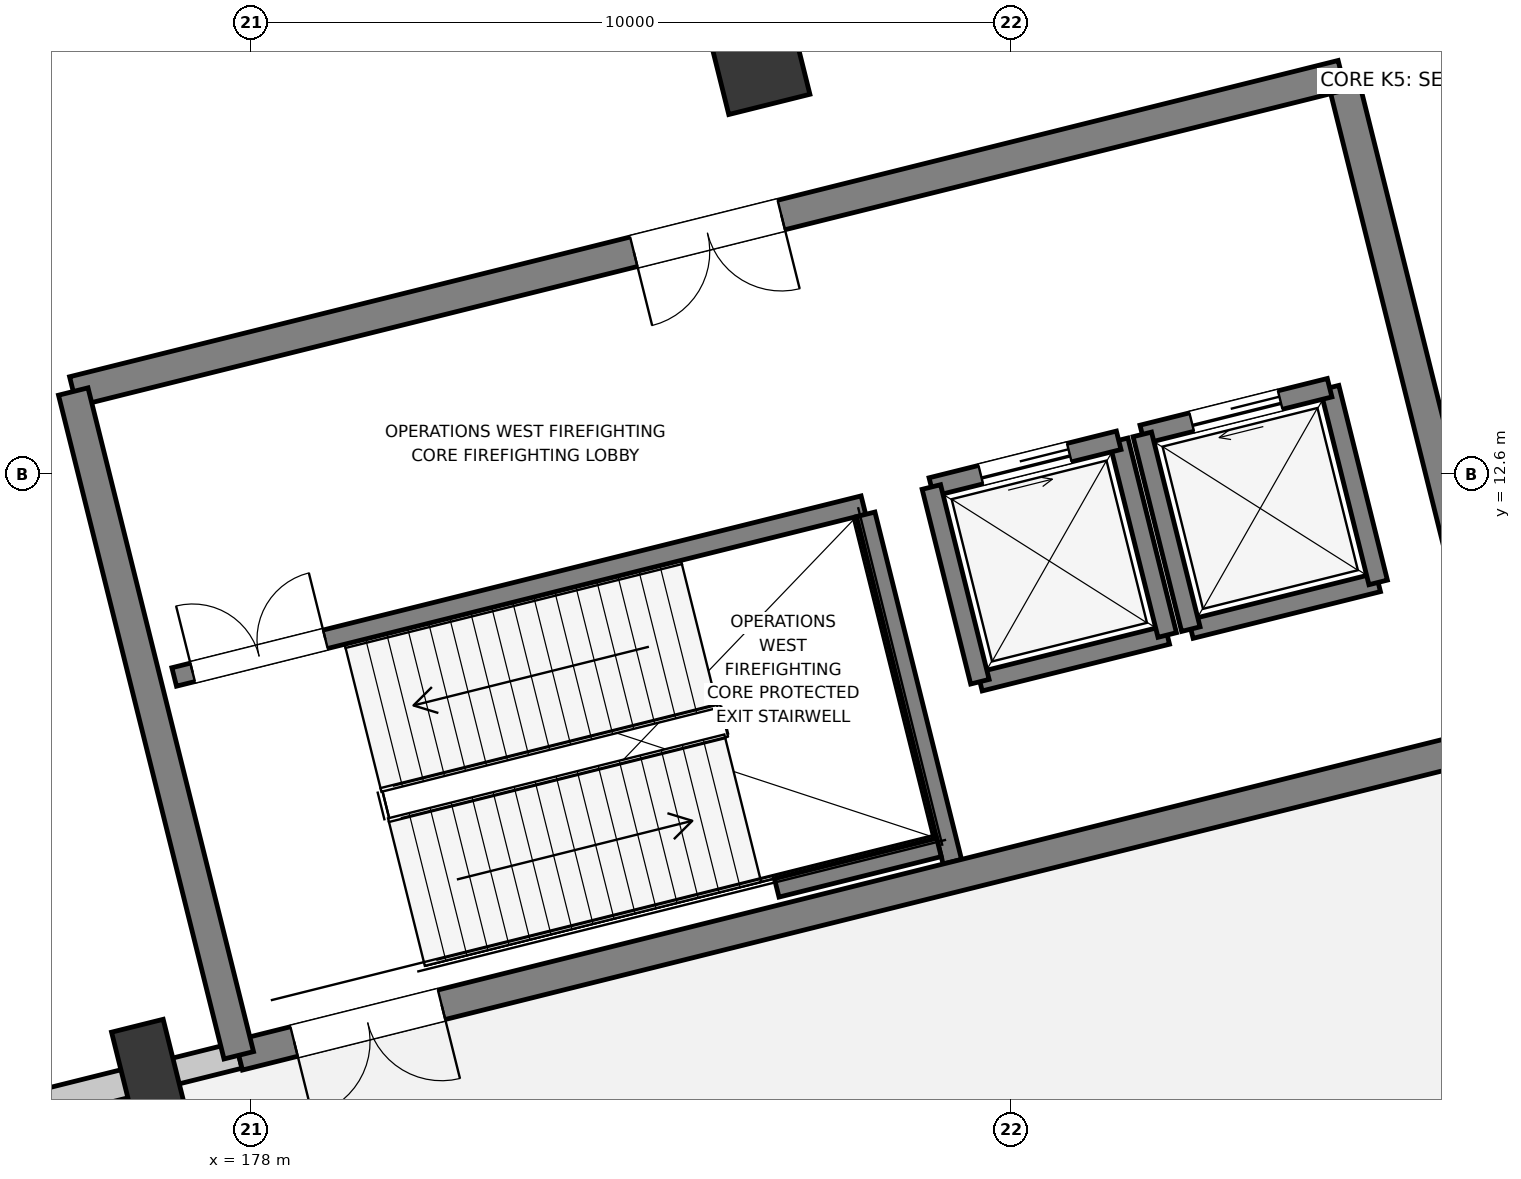
"""IFC4 building model, lengths in metres.
Left out: names, types, materials, properties, quantities, classifications, styles, units other than length and angle.
Written with IfcOpenShell. Run it as: python <this file> out.ifc"""

import sys

from ifc_helpers import new_model, si_unit, direction, frame, frame_2d, origin, origin_2d, place, context, subcontext, project, spatial, rectangle, extrude, element, fill, save


model = new_model("IFC4")
c1 = context("Model", 3, precision=1e-05, world=origin(), true_north=direction((0.0, 1.0)))
c2 = subcontext(c1, "Body", "Model", "MODEL_VIEW")
j1 = project(units=[si_unit("LENGTHUNIT", "METRE"), si_unit("PLANEANGLEUNIT", "RADIAN")], contexts=[c1])
p1 = place(None, origin())
s1 = spatial("IfcSite", under=j1, at=p1, CompositionType="ELEMENT")
p2 = place(p1, origin())
s2 = spatial("IfcBuilding", under=s1, at=p2, CompositionType="ELEMENT")
p3 = place(p2, origin())
s3 = spatial("IfcBuildingStorey", under=s2, at=p3, CompositionType="ELEMENT", Elevation=0.0)
p4 = place(p3, frame((176.673, 4.661, 0.0), z_axis=(0.0, 0.0, 1.0), x_axis=(0.970295726276, 0.2419218956, 0.0)))
e1 = element("IfcColumn", 1, at=p4, inside=s3, PredefinedType="COLUMN", context=c2, shape_type="SweptSolid", body=[
    extrude(rectangle(XDim=0.7, YDim=1.4, at=origin_2d()), origin(), (0.0, 0.0, 1.0), 6.0),
])
p5 = place(p3, frame((184.685, 17.995, 0.0), z_axis=(0.0, 0.0, 1.0), x_axis=(0.970295726276, 0.2419218956, 0.0)))
e2 = element("IfcColumn", 2, at=p5, inside=s3, PredefinedType="COLUMN", context=c2, shape_type="SweptSolid", body=[
    extrude(rectangle(XDim=1.1, YDim=1.1, at=origin_2d()), origin(), (0.0, 0.0, 1.0), 6.0),
])
p6 = place(p3, frame((166.209, 2.052, 0.0), z_axis=(0.0, 0.0, 1.0), x_axis=(0.970296811027, 0.24191754486, 0.0)))
e3 = element("IfcWall", 3, at=p6, inside=s3, PredefinedType="STANDARD", context=c2, shape_type="SweptSolid", body=[
    extrude(rectangle(XDim=10.47, YDim=0.38, at=frame_2d((5.235, 0.0))), origin(), (0.0, 0.0, 1.0), 5.015),
])
p7 = place(p6, frame((4.3, 0.0, 0.0)))
e4 = element("IfcOpeningElement", 4, at=p7, cuts=e3, PredefinedType="OPENING", context=c2, shape_type="SweptSolid", body=[
    extrude(rectangle(XDim=2.4, YDim=2.5, at=frame_2d((1.2, 1.25))), frame((0.0, 0.2, 0.0), z_axis=(0.0, -1.0, 0.0), x_axis=(1.0, 0.0, 0.0)), (0.0, 0.0, 1.0), 0.4),
])
p8 = place(p3, frame((176.673, 4.661, 0.0), z_axis=(0.0, 0.0, 1.0), x_axis=(0.970294277425, 0.24192770655, 0.0)))
e5 = element("IfcWall", 5, at=p8, inside=s3, PredefinedType="STANDARD", context=c2, shape_type="SweptSolid", body=[
    extrude(rectangle(XDim=1.2, YDim=0.35, at=frame_2d((0.6, 0.0))), origin(), (0.0, 0.0, 1.0), 5.625),
])
p9 = place(p3, frame((187.588, 9.866, 0.0), z_axis=(0.0, 0.0, 1.0), x_axis=(0.97029284861, 0.241933436994, 0.0)))
e6 = element("IfcWall", 6, at=p9, inside=s3, PredefinedType="SOLIDWALL", context=c2, shape_type="SweptSolid", body=[
    extrude(rectangle(XDim=2.54, YDim=0.25, at=frame_2d((1.27, 0.0))), origin(), (0.0, 0.0, 1.0), 5.64),
])
p10 = place(p3, frame((190.053, 10.481, 0.0), z_axis=(0.0, 0.0, 1.0), x_axis=(-0.241938414856, 0.970291607413, 0.0)))
e7 = element("IfcWall", 7, at=p10, inside=s3, PredefinedType="SOLIDWALL", context=c2, shape_type="SweptSolid", body=[
    extrude(rectangle(XDim=2.64, YDim=0.25, at=frame_2d((1.32, 0.0))), origin(), (0.0, 0.0, 1.0), 5.64),
])
p11 = place(p3, frame((189.414, 13.042, 0.0), z_axis=(0.0, 0.0, 1.0), x_axis=(-0.97029284861, -0.241933436994, 0.0)))
e8 = element("IfcWall", 8, at=p11, inside=s3, PredefinedType="SOLIDWALL", context=c2, shape_type="SweptSolid", body=[
    extrude(rectangle(XDim=2.54, YDim=0.25, at=frame_2d((1.27, 0.0))), origin(), (0.0, 0.0, 1.0), 5.64),
])
p12 = place(p11, frame((0.67, 0.0, 0.0)))
e9 = element("IfcOpeningElement", 9, at=p12, cuts=e8, PredefinedType="OPENING", context=c2, shape_type="SweptSolid", body=[
    extrude(rectangle(XDim=1.2, YDim=2.2, at=frame_2d((0.6, 1.1))), frame((0.0, 0.135, 0.0), z_axis=(0.0, -1.0, 0.0), x_axis=(1.0, 0.0, 0.0)), (0.0, 0.0, 1.0), 0.27),
])
p13 = place(p3, frame((186.95, 12.428, 0.0), z_axis=(0.0, 0.0, 1.0), x_axis=(0.241938414856, -0.970291607413, 0.0)))
e10 = element("IfcWall", 10, at=p13, inside=s3, PredefinedType="SOLIDWALL", context=c2, shape_type="SweptSolid", body=[
    extrude(rectangle(XDim=2.64, YDim=0.25, at=frame_2d((1.32, 0.0))), origin(), (0.0, 0.0, 1.0), 5.64),
])
p14 = place(p3, frame((190.363, 10.558, 0.0), z_axis=(0.0, 0.0, 1.0), x_axis=(0.97029284861, 0.241933436994, 0.0)))
e11 = element("IfcWall", 11, at=p14, inside=s3, PredefinedType="SOLIDWALL", context=c2, shape_type="SweptSolid", body=[
    extrude(rectangle(XDim=2.54, YDim=0.25, at=frame_2d((1.27, 0.0))), origin(), (0.0, 0.0, 1.0), 5.64),
])
p15 = place(p3, frame((192.828, 11.173, 0.0), z_axis=(0.0, 0.0, 1.0), x_axis=(-0.241938414856, 0.970291607413, 0.0)))
e12 = element("IfcWall", 12, at=p15, inside=s3, PredefinedType="SOLIDWALL", context=c2, shape_type="SweptSolid", body=[
    extrude(rectangle(XDim=2.64, YDim=0.25, at=frame_2d((1.32, 0.0))), origin(), (0.0, 0.0, 1.0), 5.64),
])
p16 = place(p3, frame((192.189, 13.734, 0.0), z_axis=(0.0, 0.0, 1.0), x_axis=(-0.97029284861, -0.241933436994, 0.0)))
e13 = element("IfcWall", 13, at=p16, inside=s3, PredefinedType="SOLIDWALL", context=c2, shape_type="SweptSolid", body=[
    extrude(rectangle(XDim=2.54, YDim=0.25, at=frame_2d((1.27, 0.0))), origin(), (0.0, 0.0, 1.0), 5.64),
])
p17 = place(p16, frame((0.67, 0.0, 0.0)))
e14 = element("IfcOpeningElement", 14, at=p17, cuts=e13, PredefinedType="OPENING", context=c2, shape_type="SweptSolid", body=[
    extrude(rectangle(XDim=1.2, YDim=2.2, at=frame_2d((0.6, 1.1))), frame((0.0, 0.135, 0.0), z_axis=(0.0, -1.0, 0.0), x_axis=(1.0, 0.0, 0.0)), (0.0, 0.0, 1.0), 0.27),
])
p18 = place(p3, frame((189.725, 13.12, 0.0), z_axis=(0.0, 0.0, 1.0), x_axis=(0.241938414856, -0.970291607413, 0.0)))
e15 = element("IfcWall", 15, at=p18, inside=s3, PredefinedType="SOLIDWALL", context=c2, shape_type="SweptSolid", body=[
    extrude(rectangle(XDim=2.64, YDim=0.25, at=frame_2d((1.32, 0.0))), origin(), (0.0, 0.0, 1.0), 5.64),
])
p19 = place(p3, frame((176.988, 9.929, 0.0), z_axis=(0.0, 0.0, 1.0), x_axis=(0.970297151331, 0.241916179943, 0.0)))
e16 = element("IfcWall", 16, at=p19, inside=s3, PredefinedType="SOLIDWALL", context=c2, shape_type="SweptSolid", body=[
    extrude(rectangle(XDim=9.345, YDim=0.25, at=frame_2d((4.673, 0.0))), origin(), (0.0, 0.0, 1.0), 5.62),
])
p20 = place(p19, frame((0.25, 0.0, 0.0)))
e17 = element("IfcOpeningElement", 17, at=p20, cuts=e16, PredefinedType="OPENING", context=c2, shape_type="SweptSolid", body=[
    extrude(rectangle(XDim=1.8, YDim=2.25, at=frame_2d((0.9, 1.125))), frame((0.0, 0.135, 0.0), z_axis=(0.0, -1.0, 0.0), x_axis=(1.0, 0.0, 0.0)), (0.0, 0.0, 1.0), 0.27),
])
p21 = place(p3, frame((187.225, 7.498, 0.0), z_axis=(0.0, 0.0, 1.0), x_axis=(-0.241911120435, 0.970298412763, 0.0)))
e18 = element("IfcWall", 18, at=p21, inside=s3, PredefinedType="SOLIDWALL", context=c2, shape_type="SweptSolid", body=[
    extrude(rectangle(XDim=4.71, YDim=0.25, at=frame_2d((2.355, 0.0))), origin(), (0.0, 0.0, 1.0), 5.62),
])
p22 = place(p3, frame((184.915, 7.154, 0.0), z_axis=(0.0, 0.0, 1.0), x_axis=(0.97029738597, 0.241915238833, 0.0)))
e19 = element("IfcWall", 19, at=p22, inside=s3, PredefinedType="SOLIDWALL", context=c2, shape_type="SweptSolid", body=[
    extrude(rectangle(XDim=2.2, YDim=0.25, at=frame_2d((1.1, 0.0))), origin(), (0.0, 0.0, 1.0), 5.62),
])
p23 = place(p3, frame((177.838, 4.951, 0.0), z_axis=(0.0, 0.0, 1.0), x_axis=(0.970295179998, 0.241924086589, 0.0)))
e20 = element("IfcWall", 20, at=p23, inside=s3, PredefinedType="SHEAR", context=c2, shape_type="SweptSolid", body=[
    extrude(rectangle(XDim=17.2, YDim=0.4, at=frame_2d((8.6, 0.0))), origin(), (0.0, 0.0, 1.0), 5.64),
])
p24 = place(p23, frame((0.75, 0.0, 0.0)))
e21 = element("IfcOpeningElement", 21, at=p24, cuts=e20, PredefinedType="OPENING", context=c2, shape_type="SweptSolid", body=[
    extrude(rectangle(XDim=2.0, YDim=2.4, at=frame_2d((1.0, 1.2))), frame((0.0, 0.21, 0.0), z_axis=(0.0, -1.0, 0.0), x_axis=(1.0, 0.0, 0.0)), (0.0, 0.0, 1.0), 0.42),
])
p25 = place(p3, frame((194.527, 9.113, 0.0), z_axis=(0.0, 0.0, 1.0), x_axis=(-0.241923808098, 0.970295249435, 0.0)))
e22 = element("IfcWall", 22, at=p25, inside=s3, PredefinedType="SHEAR", context=c2, shape_type="SweptSolid", body=[
    extrude(rectangle(XDim=9.0, YDim=0.4, at=frame_2d((4.5, 0.0))), origin(), (0.0, 0.0, 1.0), 5.64),
])
p26 = place(p3, frame((192.349, 17.845, 0.0), z_axis=(0.0, 0.0, 1.0), x_axis=(-0.970296544738, -0.241918612906, 0.0)))
e23 = element("IfcWall", 23, at=p26, inside=s3, PredefinedType="SHEAR", context=c2, shape_type="SweptSolid", body=[
    extrude(rectangle(XDim=17.2, YDim=0.4, at=frame_2d((8.6, 0.0))), origin(), (0.0, 0.0, 1.0), 5.64),
])
p27 = place(p26, frame((7.6, 0.0, 0.0)))
e24 = element("IfcOpeningElement", 24, at=p27, cuts=e23, PredefinedType="OPENING", context=c2, shape_type="SweptSolid", body=[
    extrude(rectangle(XDim=2.0, YDim=2.3, at=frame_2d((1.0, 1.15))), frame((0.0, 0.21, 0.0), z_axis=(0.0, -1.0, 0.0), x_axis=(1.0, 0.0, 0.0)), (0.0, 0.0, 1.0), 0.42),
])
p28 = place(p3, frame((175.66, 13.684, 0.0), z_axis=(0.0, 0.0, 1.0), x_axis=(0.241921199913, -0.97029589973, 0.0)))
e25 = element("IfcWall", 25, at=p28, inside=s3, PredefinedType="SHEAR", context=c2, shape_type="SweptSolid", body=[
    extrude(rectangle(XDim=9.0, YDim=0.4, at=frame_2d((4.5, 0.0))), origin(), (0.0, 0.0, 1.0), 5.64),
])
p29 = place(p3, frame((190.898, 24.492, 0.0), z_axis=(0.0, 0.0, 1.0), x_axis=(-0.97029524823, -0.241923812931, 0.0)))
e26 = element("IfcWall", 26, at=p29, inside=s3, PredefinedType="PARTITIONING", context=c2, shape_type="SweptSolid", body=[
    extrude(rectangle(XDim=29.0, YDim=0.16, at=frame_2d((14.5, 0.0))), origin(), (0.0, 0.0, 1.0), 4.565),
])
p30 = place(p29, frame((13.95, 0.0, 0.0)))
e27 = element("IfcOpeningElement", 27, at=p30, cuts=e26, PredefinedType="OPENING", context=c2, shape_type="SweptSolid", body=[
    extrude(rectangle(XDim=1.1, YDim=2.2, at=frame_2d((0.55, 1.1))), frame((0.0, 0.09, 0.0), z_axis=(0.0, -1.0, 0.0), x_axis=(1.0, 0.0, 0.0)), (0.0, 0.0, 1.0), 0.18),
])
p31 = place(p12, origin())
e28 = element("IfcDoor", 28, at=p31, inside=s3, OperationType="SLIDING_TO_LEFT", PredefinedType="DOOR", context=c2, shape_type="SweptSolid", body=[
    extrude(rectangle(XDim=1.2, YDim=2.2, at=frame_2d((0.6, 1.1))), frame((0.0, 0.025, 0.0), z_axis=(0.0, -1.0, 0.0), x_axis=(1.0, 0.0, 0.0)), (0.0, 0.0, 1.0), 0.05),
])
fill(e9, e28)
p32 = place(p17, origin())
e29 = element("IfcDoor", 29, at=p32, inside=s3, OperationType="SLIDING_TO_RIGHT", PredefinedType="DOOR", context=c2, shape_type="SweptSolid", body=[
    extrude(rectangle(XDim=1.2, YDim=2.2, at=frame_2d((0.6, 1.1))), frame((0.0, 0.025, 0.0), z_axis=(0.0, -1.0, 0.0), x_axis=(1.0, 0.0, 0.0)), (0.0, 0.0, 1.0), 0.05),
])
fill(e14, e29)
p33 = place(p20, origin())
e30 = element("IfcDoor", 30, at=p33, inside=s3, OperationType="DOUBLE_DOOR_SINGLE_SWING", PredefinedType="DOOR", context=c2, shape_type="SweptSolid", body=[
    extrude(rectangle(XDim=1.8, YDim=2.25, at=frame_2d((0.9, 1.125))), frame((0.0, 0.025, 0.0), z_axis=(0.0, -1.0, 0.0), x_axis=(1.0, 0.0, 0.0)), (0.0, 0.0, 1.0), 0.05),
])
fill(e17, e30)
p34 = place(p24, frame((2.0, 0.0, 0.0), z_axis=(0.0, 0.0, 1.0), x_axis=(-1.0, 0.0, 0.0)))
e31 = element("IfcDoor", 31, at=p34, inside=s3, OperationType="DOUBLE_DOOR_SINGLE_SWING", PredefinedType="DOOR", context=c2, shape_type="SweptSolid", body=[
    extrude(rectangle(XDim=2.0, YDim=2.4, at=frame_2d((1.0, 1.2))), frame((0.0, 0.025, 0.0), z_axis=(0.0, -1.0, 0.0), x_axis=(1.0, 0.0, 0.0)), (0.0, 0.0, 1.0), 0.05),
])
fill(e21, e31)
p35 = place(p27, origin())
e32 = element("IfcDoor", 32, at=p35, inside=s3, OperationType="DOUBLE_DOOR_SINGLE_SWING", PredefinedType="DOOR", context=c2, shape_type="SweptSolid", body=[
    extrude(rectangle(XDim=2.0, YDim=2.3, at=frame_2d((1.0, 1.15))), frame((0.0, 0.025, 0.0), z_axis=(0.0, -1.0, 0.0), x_axis=(1.0, 0.0, 0.0)), (0.0, 0.0, 1.0), 0.05),
])
fill(e24, e32)
save(model, sys.argv[1])
